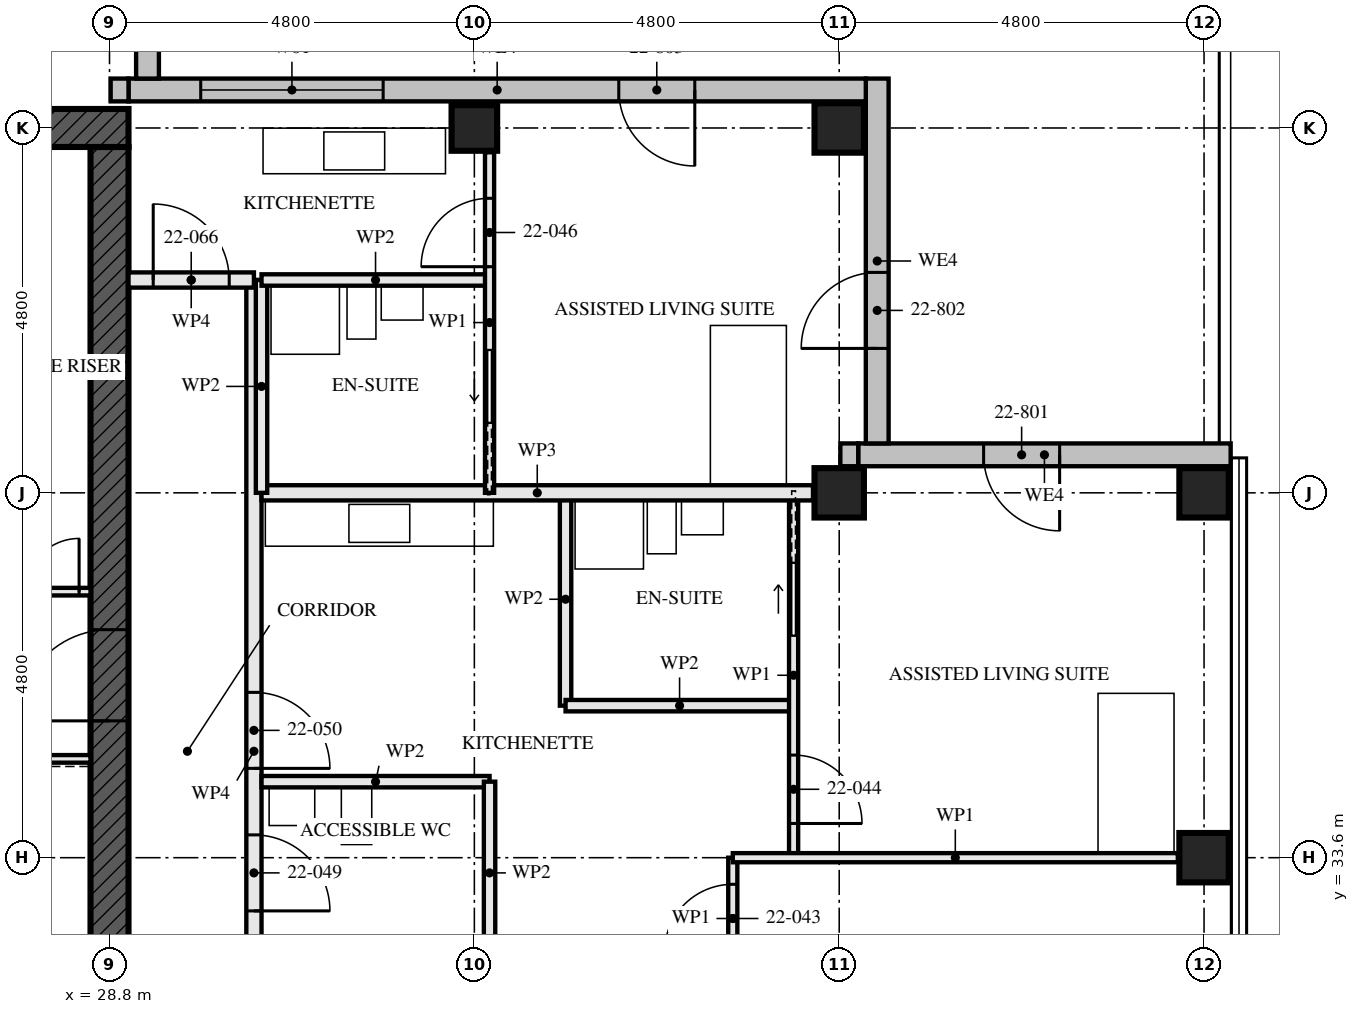
"""IFC4 building model, lengths in metres.
Left out: names, types, materials, properties, quantities, classifications, styles, units other than length and angle.
Written with IfcOpenShell. Run it as: python <this file> out.ifc"""

import sys

from ifc_helpers import new_model, si_unit, direction, frame, frame_2d, origin, origin_2d, place, context, subcontext, project, spatial, rectangle, hollow_rectangle, extrude, element, fill, save


model = new_model("IFC4")
c1 = context("Model", 3, precision=1e-05, world=origin(), true_north=direction((0.0, 1.0)))
c2 = subcontext(c1, "Body", "Model", "MODEL_VIEW")
j1 = project(units=[si_unit("LENGTHUNIT", "METRE"), si_unit("PLANEANGLEUNIT", "RADIAN")], contexts=[c1])
p1 = place(None, origin())
s1 = spatial("IfcSite", under=j1, at=p1, CompositionType="ELEMENT")
p2 = place(p1, origin())
s2 = spatial("IfcBuilding", under=s1, at=p2, CompositionType="ELEMENT")
p3 = place(p2, frame((0.0, 0.0, 84.0)))
s3 = spatial("IfcBuildingStorey", under=s2, at=p3, CompositionType="ELEMENT", Elevation=84.0)
p4 = place(p3, frame((33.6, 43.2, 0.0), z_axis=(0.0, 0.0, 1.0), x_axis=(0.0, 1.0, 0.0)))
e1 = element("IfcColumn", 1, at=p4, inside=s3, PredefinedType="COLUMN", context=c2, shape_type="SweptSolid", body=[
    extrude(hollow_rectangle(XDim=0.6, YDim=0.6, WallThickness=0.08, at=origin_2d()), origin(), (0.0, 0.0, 1.0), 3.5),
])
for number, where, z_axis, x_axis in (
    (2, (38.4, 38.4, 0.0), (0.0, 0.0, 1.0), (0.0, 1.0, 0.0)),
    (3, (38.4, 43.2, 0.0), (0.0, 0.0, 1.0), (0.0, 1.0, 0.0)),
    (4, (43.2, 33.6, 0.0), (0.0, 0.0, 1.0), (1.0, 0.0, 0.0)),
    (5, (43.2, 38.4, 0.0), (0.0, 0.0, 1.0), (0.0, 1.0, 0.0)),
):
    element("IfcColumn", number, at=place(p3, frame(where, z_axis=z_axis, x_axis=x_axis)), inside=s3, PredefinedType="COLUMN", context=c2, shape_type="SweptSolid", body=[
        extrude(hollow_rectangle(XDim=0.65, YDim=0.65, WallThickness=0.08, at=origin_2d()), origin(), (0.0, 0.0, 1.0), 3.5),
    ])
p5 = place(p3, frame((29.05, 43.2, -0.17), z_axis=(0.0, 0.0, 1.0), x_axis=(-1.0, 0.0, 0.0)))
e6 = element("IfcWall", 6, at=p5, inside=s3, PredefinedType="SHEAR", context=c2, shape_type="SweptSolid", body=[
    extrude(rectangle(XDim=14.9, YDim=0.5, at=frame_2d((7.45, 0.0))), origin(), (0.0, 0.0, 1.0), 3.5),
])
p6 = place(p5, frame((6.85, 0.0, 0.17)))
e7 = element("IfcOpeningElement", 7, at=p6, cuts=e6, PredefinedType="OPENING", context=c2, shape_type="SweptSolid", body=[
    extrude(rectangle(XDim=1.2, YDim=2.1, at=frame_2d((0.6, 1.05))), frame((0.0, 0.26, 0.0), z_axis=(0.0, -1.0, 0.0), x_axis=(1.0, 0.0, 0.0)), (0.0, 0.0, 1.0), 0.521),
])
p7 = place(p3, frame((28.8, 29.05, -0.17), z_axis=(0.0, 0.0, 1.0), x_axis=(0.0, 1.0, 0.0)))
e8 = element("IfcWall", 8, at=p7, inside=s3, PredefinedType="SHEAR", context=c2, shape_type="SweptSolid", body=[
    extrude(rectangle(XDim=13.9, YDim=0.5, at=frame_2d((6.95, 0.0))), origin(), (0.0, 0.0, 1.0), 3.5),
])
p8 = place(p7, frame((6.35, 0.0, 0.17)))
e9 = element("IfcOpeningElement", 9, at=p8, cuts=e8, PredefinedType="OPENING", context=c2, shape_type="SweptSolid", body=[
    extrude(rectangle(XDim=1.2, YDim=2.1, at=frame_2d((0.6, 1.05))), frame((0.0, 0.26, 0.0), z_axis=(0.0, -1.0, 0.0), x_axis=(1.0, 0.0, 0.0)), (0.0, 0.0, 1.0), 0.521),
])
p9 = place(p3, frame((43.55, 38.9, 0.0), z_axis=(0.0, 0.0, 1.0), x_axis=(-1.0, 0.0, 0.0)))
e10 = element("IfcWall", 10, at=p9, inside=s3, PredefinedType="SOLIDWALL", context=c2, shape_type="SweptSolid", body=[
    extrude(rectangle(XDim=4.9, YDim=0.3, at=frame_2d((2.45, 0.0))), origin(), (0.0, 0.0, 1.0), 3.5),
])
p10 = place(p9, frame((2.25, 0.0, 0.0)))
e11 = element("IfcOpeningElement", 11, at=p10, cuts=e10, PredefinedType="OPENING", context=c2, shape_type="SweptSolid", body=[
    extrude(rectangle(XDim=1.0, YDim=2.4, at=frame_2d((0.5, 1.2))), frame((0.0, 0.161, 0.0), z_axis=(0.0, -1.0, 0.0), x_axis=(1.0, 0.0, 0.0)), (0.0, 0.0, 1.0), 0.321),
])
p11 = place(p3, frame((38.9, 39.05, 0.0), z_axis=(0.0, 0.0, 1.0), x_axis=(0.0, 1.0, 0.0)))
e12 = element("IfcWall", 12, at=p11, inside=s3, PredefinedType="SOLIDWALL", context=c2, shape_type="SweptSolid", body=[
    extrude(rectangle(XDim=4.8, YDim=0.3, at=frame_2d((2.4, 0.0))), origin(), (0.0, 0.0, 1.0), 3.5),
])
p12 = place(p11, frame((1.25, 0.0, 0.0)))
e13 = element("IfcOpeningElement", 13, at=p12, cuts=e12, PredefinedType="OPENING", context=c2, shape_type="SweptSolid", body=[
    extrude(rectangle(XDim=1.0, YDim=2.4, at=frame_2d((0.5, 1.2))), frame((0.0, 0.161, 0.0), z_axis=(0.0, -1.0, 0.0), x_axis=(1.0, 0.0, 0.0)), (0.0, 0.0, 1.0), 0.321),
])
p13 = place(p3, frame((38.75, 43.7, 0.0), z_axis=(0.0, 0.0, 1.0), x_axis=(-1.0, 0.0, 0.0)))
e14 = element("IfcWall", 14, at=p13, inside=s3, PredefinedType="SOLIDWALL", context=c2, shape_type="SweptSolid", body=[
    extrude(rectangle(XDim=9.7, YDim=0.3, at=frame_2d((4.85, 0.0))), origin(), (0.0, 0.0, 1.0), 3.5),
])
p14 = place(p13, frame((2.25, 0.0, 0.0)))
e15 = element("IfcOpeningElement", 15, at=p14, cuts=e14, PredefinedType="OPENING", context=c2, shape_type="SweptSolid", body=[
    extrude(rectangle(XDim=1.0, YDim=2.4, at=frame_2d((0.5, 1.2))), frame((0.0, 0.161, 0.0), z_axis=(0.0, -1.0, 0.0), x_axis=(1.0, 0.0, 0.0)), (0.0, 0.0, 1.0), 0.321),
])
p15 = place(p13, frame((6.35, 0.0, 0.6)))
e16 = element("IfcOpeningElement", 16, at=p15, cuts=e14, PredefinedType="OPENING", context=c2, shape_type="SweptSolid", body=[
    extrude(rectangle(XDim=2.4, YDim=1.8, at=frame_2d((1.2, 0.9))), frame((0.0, 0.161, 0.0), z_axis=(0.0, -1.0, 0.0), x_axis=(1.0, 0.0, 0.0)), (0.0, 0.0, 1.0), 0.321),
])
p16 = place(p3, frame((29.3, 43.85, 0.0), z_axis=(0.0, 0.0, 1.0), x_axis=(0.0, 1.0, 0.0)))
e17 = element("IfcWall", 17, at=p16, inside=s3, PredefinedType="SOLIDWALL", context=c2, shape_type="SweptSolid", body=[
    extrude(rectangle(XDim=9.6, YDim=0.3, at=frame_2d((4.8, 0.0))), origin(), (0.0, 0.0, 1.0), 3.5),
])
p17 = place(p16, frame((6.05, 0.0, 0.0)))
e18 = element("IfcOpeningElement", 18, at=p17, cuts=e17, PredefinedType="OPENING", context=c2, shape_type="SweptSolid", body=[
    extrude(rectangle(XDim=1.0, YDim=2.4, at=frame_2d((0.5, 1.2))), frame((0.0, 0.161, 0.0), z_axis=(0.0, -1.0, 0.0), x_axis=(1.0, 0.0, 0.0)), (0.0, 0.0, 1.0), 0.321),
])
p18 = place(p16, frame((0.55, 0.0, 0.6)))
e19 = element("IfcOpeningElement", 19, at=p18, cuts=e17, PredefinedType="OPENING", context=c2, shape_type="SweptSolid", body=[
    extrude(rectangle(XDim=2.4, YDim=1.8, at=frame_2d((1.2, 0.9))), frame((0.0, 0.161, 0.0), z_axis=(0.0, -1.0, 0.0), x_axis=(1.0, 0.0, 0.0)), (0.0, 0.0, 1.0), 0.321),
])
p19 = place(p3, frame((38.65, 38.9, 2.39), z_axis=(0.0, 0.0, 1.0), x_axis=(-1.0, 0.0, 0.0)))
e20 = element("IfcWall", 20, at=p19, inside=s3, PredefinedType="SOLIDWALL", context=c2, shape_type="SweptSolid", body=[
    extrude(rectangle(XDim=0.235, YDim=0.3, at=frame_2d((0.117, 0.0))), origin(), (0.0, 0.0, 1.0), 0.88),
])
p20 = place(p3, frame((29.05, 43.7, 2.39), z_axis=(0.0, 0.0, 1.0), x_axis=(-1.0, 0.0, 0.0)))
e21 = element("IfcWall", 21, at=p20, inside=s3, PredefinedType="SOLIDWALL", context=c2, shape_type="SweptSolid", body=[
    extrude(rectangle(XDim=0.235, YDim=0.3, at=frame_2d((0.118, 0.0))), origin(), (0.0, 0.0, 1.0), 0.88),
])
p21 = place(p3, frame((33.8, 32.2, 0.0), z_axis=(0.0, 0.0, 1.0), x_axis=(0.0, 1.0, 0.0)))
e22 = element("IfcWall", 22, at=p21, inside=s3, PredefinedType="PARTITIONING", context=c2, shape_type="SweptSolid", body=[
    extrude(rectangle(XDim=2.4, YDim=0.15, at=frame_2d((1.2, 0.0))), origin(), (0.0, 0.0, 1.0), 2.55),
])
for number, where, z_axis, x_axis in (
    (23, (33.8, 34.6, 0.0), (0.0, 0.0, 1.0), (-1.0, 0.0, 0.0)),
    (24, (37.8, 35.6, 0.0), (0.0, 0.0, 1.0), (-1.0, 0.0, 0.0)),
):
    element("IfcWall", number, at=place(p3, frame(where, z_axis=z_axis, x_axis=x_axis)), inside=s3, PredefinedType="PARTITIONING", context=c2, shape_type="SweptSolid", body=[
        extrude(rectangle(XDim=3.0, YDim=0.15, at=frame_2d((1.5, 0.0))), origin(), (0.0, 0.0, 1.0), 3.33),
    ])
p22 = place(p3, frame((34.8, 35.6, 0.0), z_axis=(0.0, 0.0, 1.0), x_axis=(0.0, 1.0, 0.0)))
e25 = element("IfcWall", 25, at=p22, inside=s3, PredefinedType="PARTITIONING", context=c2, shape_type="SweptSolid", body=[
    extrude(rectangle(XDim=2.8, YDim=0.15, at=frame_2d((1.4, 0.0))), origin(), (0.0, 0.0, 1.0), 3.33),
])
p23 = place(p3, frame((37.0, 32.0, 0.0), z_axis=(0.0, 0.0, 1.0), x_axis=(0.0, 1.0, 0.0)))
e26 = element("IfcWall", 26, at=p23, inside=s3, PredefinedType="PARTITIONING", context=c2, shape_type="SweptSolid", body=[
    extrude(rectangle(XDim=1.6, YDim=0.12, at=frame_2d((0.8, 0.0))), origin(), (0.0, 0.0, 1.0), 3.33),
])
p24 = place(p23, frame((0.35, 0.0, 0.0)))
e27 = element("IfcOpeningElement", 27, at=p24, cuts=e26, PredefinedType="OPENING", context=c2, shape_type="SweptSolid", body=[
    extrude(rectangle(XDim=0.9, YDim=2.1, at=frame_2d((0.45, 1.05))), frame((0.0, 0.071, 0.0), z_axis=(0.0, -1.0, 0.0), x_axis=(1.0, 0.0, 0.0)), (0.0, 0.0, 1.0), 0.141),
])
p25 = place(p3, frame((37.8, 33.6, 0.0), z_axis=(0.0, 0.0, 1.0), x_axis=(0.0, 1.0, 0.0)))
e28 = element("IfcWall", 28, at=p25, inside=s3, PredefinedType="PARTITIONING", context=c2, shape_type="SweptSolid", body=[
    extrude(rectangle(XDim=4.8, YDim=0.12, at=frame_2d((2.4, 0.0))), origin(), (0.0, 0.0, 1.0), 3.33),
])
p26 = place(p25, frame((0.45, 0.0, 0.0)))
e29 = element("IfcOpeningElement", 29, at=p26, cuts=e28, PredefinedType="OPENING", context=c2, shape_type="SweptSolid", body=[
    extrude(rectangle(XDim=0.9, YDim=2.1, at=frame_2d((0.45, 1.05))), frame((0.0, 0.071, 0.0), z_axis=(0.0, -1.0, 0.0), x_axis=(1.0, 0.0, 0.0)), (0.0, 0.0, 1.0), 0.141),
])
p27 = place(p25, frame((2.925, 0.0, 0.0)))
e30 = element("IfcOpeningElement", 30, at=p27, cuts=e28, PredefinedType="OPENING", context=c2, shape_type="SweptSolid", body=[
    extrude(rectangle(XDim=0.95, YDim=2.1, at=frame_2d((0.475, 1.05))), frame((0.0, 0.071, 0.0), z_axis=(0.0, -1.0, 0.0), x_axis=(1.0, 0.0, 0.0)), (0.0, 0.0, 1.0), 0.141),
])
p28 = place(p3, frame((42.855, 33.6, 0.0), z_axis=(0.0, 0.0, 1.0), x_axis=(-1.0, 0.0, 0.0)))
e31 = element("IfcWall", 31, at=p28, inside=s3, PredefinedType="PARTITIONING", context=c2, shape_type="SweptSolid", body=[
    extrude(rectangle(XDim=5.855, YDim=0.12, at=frame_2d((2.927, 0.0))), origin(), (0.0, 0.0, 1.0), 2.55),
])
p29 = place(p3, frame((38.055, 38.4, 0.0), z_axis=(0.0, 0.0, 1.0), x_axis=(-1.0, 0.0, 0.0)))
e32 = element("IfcWall", 32, at=p29, inside=s3, PredefinedType="PARTITIONING", context=c2, shape_type="SweptSolid", body=[
    extrude(rectangle(XDim=7.255, YDim=0.2, at=frame_2d((3.627, 0.0))), origin(), (0.0, 0.0, 1.0), 2.55),
])
p30 = place(p3, frame((33.8, 41.2, 0.0), z_axis=(0.0, 0.0, 1.0), x_axis=(-1.0, 0.0, 0.0)))
e33 = element("IfcWall", 33, at=p30, inside=s3, PredefinedType="PARTITIONING", context=c2, shape_type="SweptSolid", body=[
    extrude(rectangle(XDim=3.0, YDim=0.15, at=frame_2d((1.5, 0.0))), origin(), (0.0, 0.0, 1.0), 3.33),
])
p31 = place(p3, frame((30.8, 38.4, 0.0), z_axis=(0.0, 0.0, 1.0), x_axis=(0.0, 1.0, 0.0)))
e34 = element("IfcWall", 34, at=p31, inside=s3, PredefinedType="PARTITIONING", context=c2, shape_type="SweptSolid", body=[
    extrude(rectangle(XDim=2.8, YDim=0.15, at=frame_2d((1.4, 0.0))), origin(), (0.0, 0.0, 1.0), 3.33),
])
p32 = place(p3, frame((33.8, 38.4, 0.0), z_axis=(0.0, 0.0, 1.0), x_axis=(0.0, 1.0, 0.0)))
e35 = element("IfcWall", 35, at=p32, inside=s3, PredefinedType="PARTITIONING", context=c2, shape_type="SweptSolid", body=[
    extrude(rectangle(XDim=4.48, YDim=0.12, at=frame_2d((2.24, 0.0))), origin(), (0.0, 0.0, 1.0), 3.33),
])
p33 = place(p32, frame((2.975, 0.0, 0.0)))
e36 = element("IfcOpeningElement", 36, at=p33, cuts=e35, PredefinedType="OPENING", context=c2, shape_type="SweptSolid", body=[
    extrude(rectangle(XDim=0.9, YDim=2.1, at=frame_2d((0.45, 1.05))), frame((0.0, 0.071, 0.0), z_axis=(0.0, -1.0, 0.0), x_axis=(1.0, 0.0, 0.0)), (0.0, 0.0, 1.0), 0.141),
])
p34 = place(p32, frame((0.925, 0.0, 0.0)))
e37 = element("IfcOpeningElement", 37, at=p34, cuts=e35, PredefinedType="OPENING", context=c2, shape_type="SweptSolid", body=[
    extrude(rectangle(XDim=0.95, YDim=2.1, at=frame_2d((0.475, 1.05))), frame((0.0, 0.071, 0.0), z_axis=(0.0, -1.0, 0.0), x_axis=(1.0, 0.0, 0.0)), (0.0, 0.0, 1.0), 0.141),
])
p35 = place(p3, frame((30.7, 28.8, 0.0), z_axis=(0.0, 0.0, 1.0), x_axis=(0.0, 1.0, 0.0)))
e38 = element("IfcWall", 38, at=p35, inside=s3, PredefinedType="PARTITIONING", context=c2, shape_type="SweptSolid", body=[
    extrude(rectangle(XDim=12.4, YDim=0.2, at=frame_2d((6.2, 0.0))), origin(), (0.0, 0.0, 1.0), 2.55),
])
p36 = place(p35, frame((1.4, 0.0, 0.0)))
e39 = element("IfcOpeningElement", 39, at=p36, cuts=e38, PredefinedType="OPENING", context=c2, shape_type="SweptSolid", body=[
    extrude(rectangle(XDim=1.0, YDim=2.1, at=frame_2d((0.5, 1.05))), frame((0.0, 0.111, 0.0), z_axis=(0.0, -1.0, 0.0), x_axis=(1.0, 0.0, 0.0)), (0.0, 0.0, 1.0), 0.221),
])
p37 = place(p35, frame((4.1, 0.0, 0.0)))
e40 = element("IfcOpeningElement", 40, at=p37, cuts=e38, PredefinedType="OPENING", context=c2, shape_type="SweptSolid", body=[
    extrude(rectangle(XDim=1.0, YDim=2.1, at=frame_2d((0.5, 1.05))), frame((0.0, 0.111, 0.0), z_axis=(0.0, -1.0, 0.0), x_axis=(1.0, 0.0, 0.0)), (0.0, 0.0, 1.0), 0.221),
])
p38 = place(p35, frame((5.975, 0.0, 0.0)))
e41 = element("IfcOpeningElement", 41, at=p38, cuts=e38, PredefinedType="OPENING", context=c2, shape_type="SweptSolid", body=[
    extrude(rectangle(XDim=1.0, YDim=2.1, at=frame_2d((0.5, 1.05))), frame((0.0, 0.111, 0.0), z_axis=(0.0, -1.0, 0.0), x_axis=(1.0, 0.0, 0.0)), (0.0, 0.0, 1.0), 0.221),
])
p39 = place(p3, frame((23.05, 34.9, 0.0), z_axis=(0.0, 0.0, 1.0), x_axis=(1.0, 0.0, 0.0)))
e42 = element("IfcWall", 42, at=p39, inside=s3, PredefinedType="SOLIDWALL", context=c2, shape_type="SweptSolid", body=[
    extrude(rectangle(XDim=5.5, YDim=0.1, at=frame_2d((2.75, 0.0))), origin(), (0.0, 0.0, 1.0), 3.33),
])
p40 = place(p3, frame((22.65, 37.1, 0.0), z_axis=(0.0, 0.0, 1.0), x_axis=(1.0, 0.0, 0.0)))
e43 = element("IfcWall", 43, at=p40, inside=s3, PredefinedType="SOLIDWALL", context=c2, shape_type="SweptSolid", body=[
    extrude(rectangle(XDim=5.9, YDim=0.1, at=frame_2d((2.95, 0.0))), origin(), (0.0, 0.0, 1.0), 3.33),
])
p41 = place(p40, frame((3.45, 0.0, 0.0)))
e44 = element("IfcOpeningElement", 44, at=p41, cuts=e43, PredefinedType="OPENING", context=c2, shape_type="SweptSolid", body=[
    extrude(rectangle(XDim=1.0, YDim=2.1, at=frame_2d((0.5, 1.05))), frame((0.0, 0.061, 0.0), z_axis=(0.0, -1.0, 0.0), x_axis=(1.0, 0.0, 0.0)), (0.0, 0.0, 1.0), 0.121),
])
p42 = place(p40, frame((5.05, 0.0, 0.0)))
e45 = element("IfcOpeningElement", 45, at=p42, cuts=e43, PredefinedType="OPENING", context=c2, shape_type="SweptSolid", body=[
    extrude(rectangle(XDim=0.7, YDim=2.1, at=frame_2d((0.35, 1.05))), frame((0.0, 0.061, 0.0), z_axis=(0.0, -1.0, 0.0), x_axis=(1.0, 0.0, 0.0)), (0.0, 0.0, 1.0), 0.121),
])
p43 = place(p3, frame((30.7, 41.2, 0.0), z_axis=(0.0, 0.0, 1.0), x_axis=(-1.0, 0.0, 0.0)))
e46 = element("IfcWall", 46, at=p43, inside=s3, PredefinedType="PARTITIONING", context=c2, shape_type="SweptSolid", body=[
    extrude(rectangle(XDim=1.65, YDim=0.2, at=frame_2d((0.825, 0.0))), origin(), (0.0, 0.0, 1.0), 3.33),
])
p44 = place(p43, frame((0.325, 0.0, 0.0)))
e47 = element("IfcOpeningElement", 47, at=p44, cuts=e46, PredefinedType="OPENING", context=c2, shape_type="SweptSolid", body=[
    extrude(rectangle(XDim=1.0, YDim=2.1, at=frame_2d((0.5, 1.05))), frame((0.0, 0.111, 0.0), z_axis=(0.0, -1.0, 0.0), x_axis=(1.0, 0.0, 0.0)), (0.0, 0.0, 1.0), 0.221),
])
p45 = place(p10, origin())
e48 = element("IfcDoor", 48, at=p45, inside=s3, OperationType="SINGLE_SWING_LEFT", PredefinedType="DOOR", context=c2, shape_type="SweptSolid", body=[
    extrude(rectangle(XDim=1.0, YDim=2.4, at=frame_2d((0.5, 1.2))), frame((0.0, 0.035, 0.0), z_axis=(0.0, -1.0, 0.0), x_axis=(1.0, 0.0, 0.0)), (0.0, 0.0, 1.0), 0.07),
])
fill(e11, e48)
p46 = place(p12, origin())
e49 = element("IfcDoor", 49, at=p46, inside=s3, OperationType="SINGLE_SWING_LEFT", PredefinedType="DOOR", context=c2, shape_type="SweptSolid", body=[
    extrude(rectangle(XDim=1.0, YDim=2.4, at=frame_2d((0.5, 1.2))), frame((0.0, 0.035, 0.0), z_axis=(0.0, -1.0, 0.0), x_axis=(1.0, 0.0, 0.0)), (0.0, 0.0, 1.0), 0.07),
])
fill(e13, e49)
p47 = place(p14, origin())
e50 = element("IfcDoor", 50, at=p47, inside=s3, OperationType="SINGLE_SWING_LEFT", PredefinedType="DOOR", context=c2, shape_type="SweptSolid", body=[
    extrude(rectangle(XDim=1.0, YDim=2.4, at=frame_2d((0.5, 1.2))), frame((0.0, 0.035, 0.0), z_axis=(0.0, -1.0, 0.0), x_axis=(1.0, 0.0, 0.0)), (0.0, 0.0, 1.0), 0.07),
])
fill(e15, e50)
p48 = place(p15, origin())
e51 = element("IfcWindow", 51, at=p48, inside=s3, PartitioningType="SINGLE_PANEL", PredefinedType="WINDOW", context=c2, shape_type="SweptSolid", body=[
    extrude(rectangle(XDim=2.4, YDim=1.8, at=frame_2d((1.2, 0.9))), frame((0.0, 0.03, 0.0), z_axis=(0.0, -1.0, 0.0), x_axis=(1.0, 0.0, 0.0)), (0.0, 0.0, 1.0), 0.06),
])
fill(e16, e51)
p49 = place(p24, origin())
e52 = element("IfcDoor", 52, at=p49, inside=s3, OperationType="SINGLE_SWING_RIGHT", PredefinedType="DOOR", context=c2, shape_type="SweptSolid", body=[
    extrude(rectangle(XDim=0.9, YDim=2.1, at=frame_2d((0.45, 1.05))), frame((0.0, 0.022, 0.0), z_axis=(0.0, -1.0, 0.0), x_axis=(1.0, 0.0, 0.0)), (0.0, 0.0, 1.0), 0.044),
])
fill(e27, e52)
p50 = place(p26, frame((0.9, 0.0, 0.0), z_axis=(0.0, 0.0, 1.0), x_axis=(-1.0, 0.0, 0.0)))
e53 = element("IfcDoor", 53, at=p50, inside=s3, OperationType="SINGLE_SWING_LEFT", PredefinedType="DOOR", context=c2, shape_type="SweptSolid", body=[
    extrude(rectangle(XDim=0.9, YDim=2.1, at=frame_2d((0.45, 1.05))), frame((0.0, 0.022, 0.0), z_axis=(0.0, -1.0, 0.0), x_axis=(1.0, 0.0, 0.0)), (0.0, 0.0, 1.0), 0.044),
])
fill(e29, e53)
p51 = place(p27, origin())
e54 = element("IfcDoor", 54, at=p51, inside=s3, OperationType="SLIDING_TO_LEFT", PredefinedType="DOOR", context=c2, shape_type="SweptSolid", body=[
    extrude(rectangle(XDim=0.95, YDim=2.1, at=frame_2d((0.475, 1.05))), frame((0.0, 0.022, 0.0), z_axis=(0.0, -1.0, 0.0), x_axis=(1.0, 0.0, 0.0)), (0.0, 0.0, 1.0), 0.044),
])
fill(e30, e54)
p52 = place(p33, origin())
e55 = element("IfcDoor", 55, at=p52, inside=s3, OperationType="SINGLE_SWING_RIGHT", PredefinedType="DOOR", context=c2, shape_type="SweptSolid", body=[
    extrude(rectangle(XDim=0.9, YDim=2.1, at=frame_2d((0.45, 1.05))), frame((0.0, 0.022, 0.0), z_axis=(0.0, -1.0, 0.0), x_axis=(1.0, 0.0, 0.0)), (0.0, 0.0, 1.0), 0.044),
])
fill(e36, e55)
p53 = place(p34, origin())
e56 = element("IfcDoor", 56, at=p53, inside=s3, OperationType="SLIDING_TO_RIGHT", PredefinedType="DOOR", context=c2, shape_type="SweptSolid", body=[
    extrude(rectangle(XDim=0.95, YDim=2.1, at=frame_2d((0.475, 1.05))), frame((0.0, 0.022, 0.0), z_axis=(0.0, -1.0, 0.0), x_axis=(1.0, 0.0, 0.0)), (0.0, 0.0, 1.0), 0.044),
])
fill(e37, e56)
p54 = place(p37, frame((1.0, 0.0, 0.0), z_axis=(0.0, 0.0, 1.0), x_axis=(-1.0, 0.0, 0.0)))
e57 = element("IfcDoor", 57, at=p54, inside=s3, OperationType="SINGLE_SWING_LEFT", PredefinedType="DOOR", context=c2, shape_type="SweptSolid", body=[
    extrude(rectangle(XDim=1.0, YDim=2.1, at=frame_2d((0.5, 1.05))), frame((0.0, 0.027, 0.0), z_axis=(0.0, -1.0, 0.0), x_axis=(1.0, 0.0, 0.0)), (0.0, 0.0, 1.0), 0.054),
])
fill(e40, e57)
p55 = place(p38, frame((1.0, 0.0, 0.0), z_axis=(0.0, 0.0, 1.0), x_axis=(-1.0, 0.0, 0.0)))
e58 = element("IfcDoor", 58, at=p55, inside=s3, OperationType="SINGLE_SWING_LEFT", PredefinedType="DOOR", context=c2, shape_type="SweptSolid", body=[
    extrude(rectangle(XDim=1.0, YDim=2.1, at=frame_2d((0.5, 1.05))), frame((0.0, 0.027, 0.0), z_axis=(0.0, -1.0, 0.0), x_axis=(1.0, 0.0, 0.0)), (0.0, 0.0, 1.0), 0.054),
])
fill(e41, e58)
p56 = place(p42, origin())
e59 = element("IfcDoor", 59, at=p56, inside=s3, OperationType="SINGLE_SWING_LEFT", PredefinedType="DOOR", context=c2, shape_type="SweptSolid", body=[
    extrude(rectangle(XDim=0.7, YDim=2.1, at=frame_2d((0.35, 1.05))), frame((0.0, 0.027, 0.0), z_axis=(0.0, -1.0, 0.0), x_axis=(1.0, 0.0, 0.0)), (0.0, 0.0, 1.0), 0.054),
])
fill(e45, e59)
p57 = place(p44, frame((1.0, 0.0, 0.0), z_axis=(0.0, 0.0, 1.0), x_axis=(-1.0, 0.0, 0.0)))
e60 = element("IfcDoor", 60, at=p57, inside=s3, OperationType="SINGLE_SWING_RIGHT", PredefinedType="DOOR", context=c2, shape_type="SweptSolid", body=[
    extrude(rectangle(XDim=1.0, YDim=2.1, at=frame_2d((0.5, 1.05))), frame((0.0, 0.027, 0.0), z_axis=(0.0, -1.0, 0.0), x_axis=(1.0, 0.0, 0.0)), (0.0, 0.0, 1.0), 0.054),
])
fill(e47, e60)
p58 = place(p8, origin())
e61 = element("IfcDoor", 61, at=p58, inside=s3, OperationType="SINGLE_SWING_LEFT", PredefinedType="DOOR", context=c2, shape_type="SweptSolid", body=[
    extrude(rectangle(XDim=1.2, YDim=2.1, at=frame_2d((0.6, 1.05))), frame((0.0, 0.027, 0.0), z_axis=(0.0, -1.0, 0.0), x_axis=(1.0, 0.0, 0.0)), (0.0, 0.0, 1.0), 0.054),
])
fill(e9, e61)
save(model, sys.argv[1])
